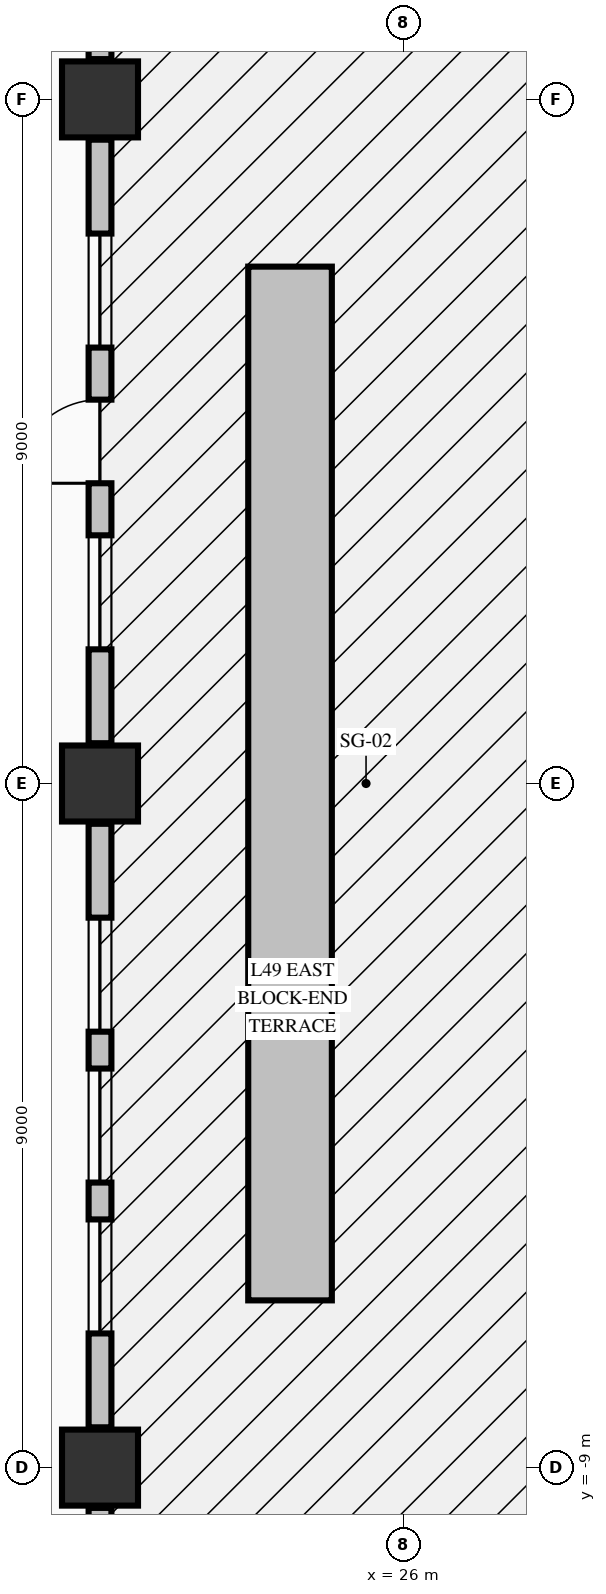
"""IFC4 building model, lengths in metres.
Left out: names, types, materials, properties, quantities, classifications, styles, units other than length and angle.
Written with IfcOpenShell. Run it as: python <this file> out.ifc"""

import sys

from ifc_helpers import new_model, si_unit, direction, frame, frame_2d, origin, origin_2d, place, context, subcontext, project, spatial, rectangle, extrude, element, fill, save


model = new_model("IFC4")
c1 = context("Model", 3, precision=1e-05, world=origin(), true_north=direction((0.0, 1.0)))
c2 = subcontext(c1, "Body", "Model", "MODEL_VIEW")
j1 = project(units=[si_unit("LENGTHUNIT", "METRE"), si_unit("PLANEANGLEUNIT", "RADIAN")], contexts=[c1])
p1 = place(None, origin())
s1 = spatial("IfcSite", under=j1, at=p1, CompositionType="ELEMENT")
p2 = place(p1, origin())
s2 = spatial("IfcBuilding", under=s1, at=p2, CompositionType="ELEMENT")
p3 = place(p2, frame((0.0, 0.0, 191.46)))
s3 = spatial("IfcBuildingStorey", under=s2, at=p3, CompositionType="ELEMENT", Elevation=191.46)
for number, where, z_axis, x_axis in (
    (1, (22.0, -9.0, -0.425), (0.0, 0.0, 1.0), (1.0, 0.0, 0.0)),
    (2, (22.0, 0.0, -0.425), (0.0, 0.0, 1.0), (1.0, 0.0, 0.0)),
    (3, (22.0, 9.0, -0.425), (0.0, 0.0, 1.0), (1.0, 0.0, 0.0)),
):
    element("IfcColumn", number, at=place(p3, frame(where, z_axis=z_axis, x_axis=x_axis)), inside=s3, PredefinedType="COLUMN", context=c2, shape_type="SweptSolid", body=[
        extrude(rectangle(XDim=1.0, YDim=1.0, at=origin_2d()), origin(), (0.0, 0.0, 1.0), 3.55),
    ])
p4 = place(p3, frame((22.0, -18.97, 0.0), z_axis=(0.0, 0.0, 1.0), x_axis=(0.0, 1.0, 0.0)))
e4 = element("IfcWall", 4, at=p4, inside=s3, PredefinedType="STANDARD", context=c2, shape_type="SweptSolid", body=[
    extrude(rectangle(XDim=9.44, YDim=0.3, at=frame_2d((4.72, 0.0))), origin(), (0.0, 0.0, 1.0), 2.517),
])
p5 = place(p3, frame((22.0, -8.47, 0.0), z_axis=(0.0, 0.0, 1.0), x_axis=(0.0, 1.0, 0.0)))
e5 = element("IfcWall", 5, at=p5, inside=s3, PredefinedType="STANDARD", context=c2, shape_type="SweptSolid", body=[
    extrude(rectangle(XDim=7.94, YDim=0.3, at=frame_2d((3.97, 0.0))), origin(), (0.0, 0.0, 1.0), 2.517),
])
p6 = place(p5, frame((1.235, 0.0, 0.72)))
e6 = element("IfcOpeningElement", 6, at=p6, cuts=e5, PredefinedType="OPENING", context=c2, shape_type="SweptSolid", body=[
    extrude(rectangle(XDim=1.5, YDim=1.6, at=frame_2d((0.75, 0.8))), frame((0.0, 0.16, 0.0), z_axis=(0.0, -1.0, 0.0), x_axis=(1.0, 0.0, 0.0)), (0.0, 0.0, 1.0), 0.32),
])
p7 = place(p5, frame((3.22, 0.0, 0.72)))
e7 = element("IfcOpeningElement", 7, at=p7, cuts=e5, PredefinedType="OPENING", context=c2, shape_type="SweptSolid", body=[
    extrude(rectangle(XDim=1.5, YDim=1.6, at=frame_2d((0.75, 0.8))), frame((0.0, 0.16, 0.0), z_axis=(0.0, -1.0, 0.0), x_axis=(1.0, 0.0, 0.0)), (0.0, 0.0, 1.0), 0.32),
])
p8 = place(p5, frame((5.205, 0.0, 0.72)))
e8 = element("IfcOpeningElement", 8, at=p8, cuts=e5, PredefinedType="OPENING", context=c2, shape_type="SweptSolid", body=[
    extrude(rectangle(XDim=1.5, YDim=1.6, at=frame_2d((0.75, 0.8))), frame((0.0, 0.16, 0.0), z_axis=(0.0, -1.0, 0.0), x_axis=(1.0, 0.0, 0.0)), (0.0, 0.0, 1.0), 0.32),
])
p9 = place(p3, frame((22.0, 0.53, 0.0), z_axis=(0.0, 0.0, 1.0), x_axis=(0.0, 1.0, 0.0)))
e9 = element("IfcWall", 9, at=p9, inside=s3, PredefinedType="STANDARD", context=c2, shape_type="SweptSolid", body=[
    extrude(rectangle(XDim=7.94, YDim=0.3, at=frame_2d((3.97, 0.0))), origin(), (0.0, 0.0, 1.0), 2.517),
])
p10 = place(p9, frame((3.42, 0.0, 0.0)))
e10 = element("IfcOpeningElement", 10, at=p10, cuts=e9, PredefinedType="OPENING", context=c2, shape_type="SweptSolid", body=[
    extrude(rectangle(XDim=1.1, YDim=2.15, at=frame_2d((0.55, 1.075))), frame((0.0, 0.16, 0.0), z_axis=(0.0, -1.0, 0.0), x_axis=(1.0, 0.0, 0.0)), (0.0, 0.0, 1.0), 0.32),
])
p11 = place(p9, frame((1.235, 0.0, 0.72)))
e11 = element("IfcOpeningElement", 11, at=p11, cuts=e9, PredefinedType="OPENING", context=c2, shape_type="SweptSolid", body=[
    extrude(rectangle(XDim=1.5, YDim=1.6, at=frame_2d((0.75, 0.8))), frame((0.0, 0.16, 0.0), z_axis=(0.0, -1.0, 0.0), x_axis=(1.0, 0.0, 0.0)), (0.0, 0.0, 1.0), 0.32),
])
p12 = place(p9, frame((5.205, 0.0, 0.72)))
e12 = element("IfcOpeningElement", 12, at=p12, cuts=e9, PredefinedType="OPENING", context=c2, shape_type="SweptSolid", body=[
    extrude(rectangle(XDim=1.5, YDim=1.6, at=frame_2d((0.75, 0.8))), frame((0.0, 0.16, 0.0), z_axis=(0.0, -1.0, 0.0), x_axis=(1.0, 0.0, 0.0)), (0.0, 0.0, 1.0), 0.32),
])
p13 = place(p3, frame((22.0, 9.53, 0.0), z_axis=(0.0, 0.0, 1.0), x_axis=(0.0, 1.0, 0.0)))
e13 = element("IfcWall", 13, at=p13, inside=s3, PredefinedType="STANDARD", context=c2, shape_type="SweptSolid", body=[
    extrude(rectangle(XDim=9.44, YDim=0.3, at=frame_2d((4.72, 0.0))), origin(), (0.0, 0.0, 1.0), 2.517),
])
p14 = place(p3, frame((24.5, -6.8, -0.04), z_axis=(0.0, 0.0, 1.0), x_axis=(0.0, 1.0, 0.0)))
e14 = element("IfcWall", 14, at=p14, inside=s3, PredefinedType="PARAPET", context=c2, shape_type="SweptSolid", body=[
    extrude(rectangle(XDim=13.6, YDim=1.1, at=frame_2d((6.8, 0.0))), origin(), (0.0, 0.0, 1.0), 0.6),
])
p15 = place(p6, origin())
e15 = element("IfcWindow", 15, at=p15, inside=s3, PartitioningType="SINGLE_PANEL", PredefinedType="WINDOW", context=c2, shape_type="SweptSolid", body=[
    extrude(rectangle(XDim=1.5, YDim=1.6, at=frame_2d((0.75, 0.8))), frame((0.0, 0.03, 0.0), z_axis=(0.0, -1.0, 0.0), x_axis=(1.0, 0.0, 0.0)), (0.0, 0.0, 1.0), 0.06),
])
fill(e6, e15)
p16 = place(p7, origin())
e16 = element("IfcWindow", 16, at=p16, inside=s3, PartitioningType="SINGLE_PANEL", PredefinedType="WINDOW", context=c2, shape_type="SweptSolid", body=[
    extrude(rectangle(XDim=1.5, YDim=1.6, at=frame_2d((0.75, 0.8))), frame((0.0, 0.03, 0.0), z_axis=(0.0, -1.0, 0.0), x_axis=(1.0, 0.0, 0.0)), (0.0, 0.0, 1.0), 0.06),
])
fill(e7, e16)
p17 = place(p8, origin())
e17 = element("IfcWindow", 17, at=p17, inside=s3, PartitioningType="SINGLE_PANEL", PredefinedType="WINDOW", context=c2, shape_type="SweptSolid", body=[
    extrude(rectangle(XDim=1.5, YDim=1.6, at=frame_2d((0.75, 0.8))), frame((0.0, 0.03, 0.0), z_axis=(0.0, -1.0, 0.0), x_axis=(1.0, 0.0, 0.0)), (0.0, 0.0, 1.0), 0.06),
])
fill(e8, e17)
p18 = place(p10, origin())
e18 = element("IfcDoor", 18, at=p18, inside=s3, OperationType="SINGLE_SWING_LEFT", PredefinedType="DOOR", context=c2, shape_type="SweptSolid", body=[
    extrude(rectangle(XDim=1.1, YDim=2.15, at=frame_2d((0.55, 1.075))), frame((0.0, 0.025, 0.0), z_axis=(0.0, -1.0, 0.0), x_axis=(1.0, 0.0, 0.0)), (0.0, 0.0, 1.0), 0.05),
])
fill(e10, e18)
p19 = place(p11, origin())
e19 = element("IfcWindow", 19, at=p19, inside=s3, PartitioningType="SINGLE_PANEL", PredefinedType="WINDOW", context=c2, shape_type="SweptSolid", body=[
    extrude(rectangle(XDim=1.5, YDim=1.6, at=frame_2d((0.75, 0.8))), frame((0.0, 0.03, 0.0), z_axis=(0.0, -1.0, 0.0), x_axis=(1.0, 0.0, 0.0)), (0.0, 0.0, 1.0), 0.06),
])
fill(e11, e19)
p20 = place(p12, origin())
e20 = element("IfcWindow", 20, at=p20, inside=s3, PartitioningType="SINGLE_PANEL", PredefinedType="WINDOW", context=c2, shape_type="SweptSolid", body=[
    extrude(rectangle(XDim=1.5, YDim=1.6, at=frame_2d((0.75, 0.8))), frame((0.0, 0.03, 0.0), z_axis=(0.0, -1.0, 0.0), x_axis=(1.0, 0.0, 0.0)), (0.0, 0.0, 1.0), 0.06),
])
fill(e12, e20)
save(model, sys.argv[1])
